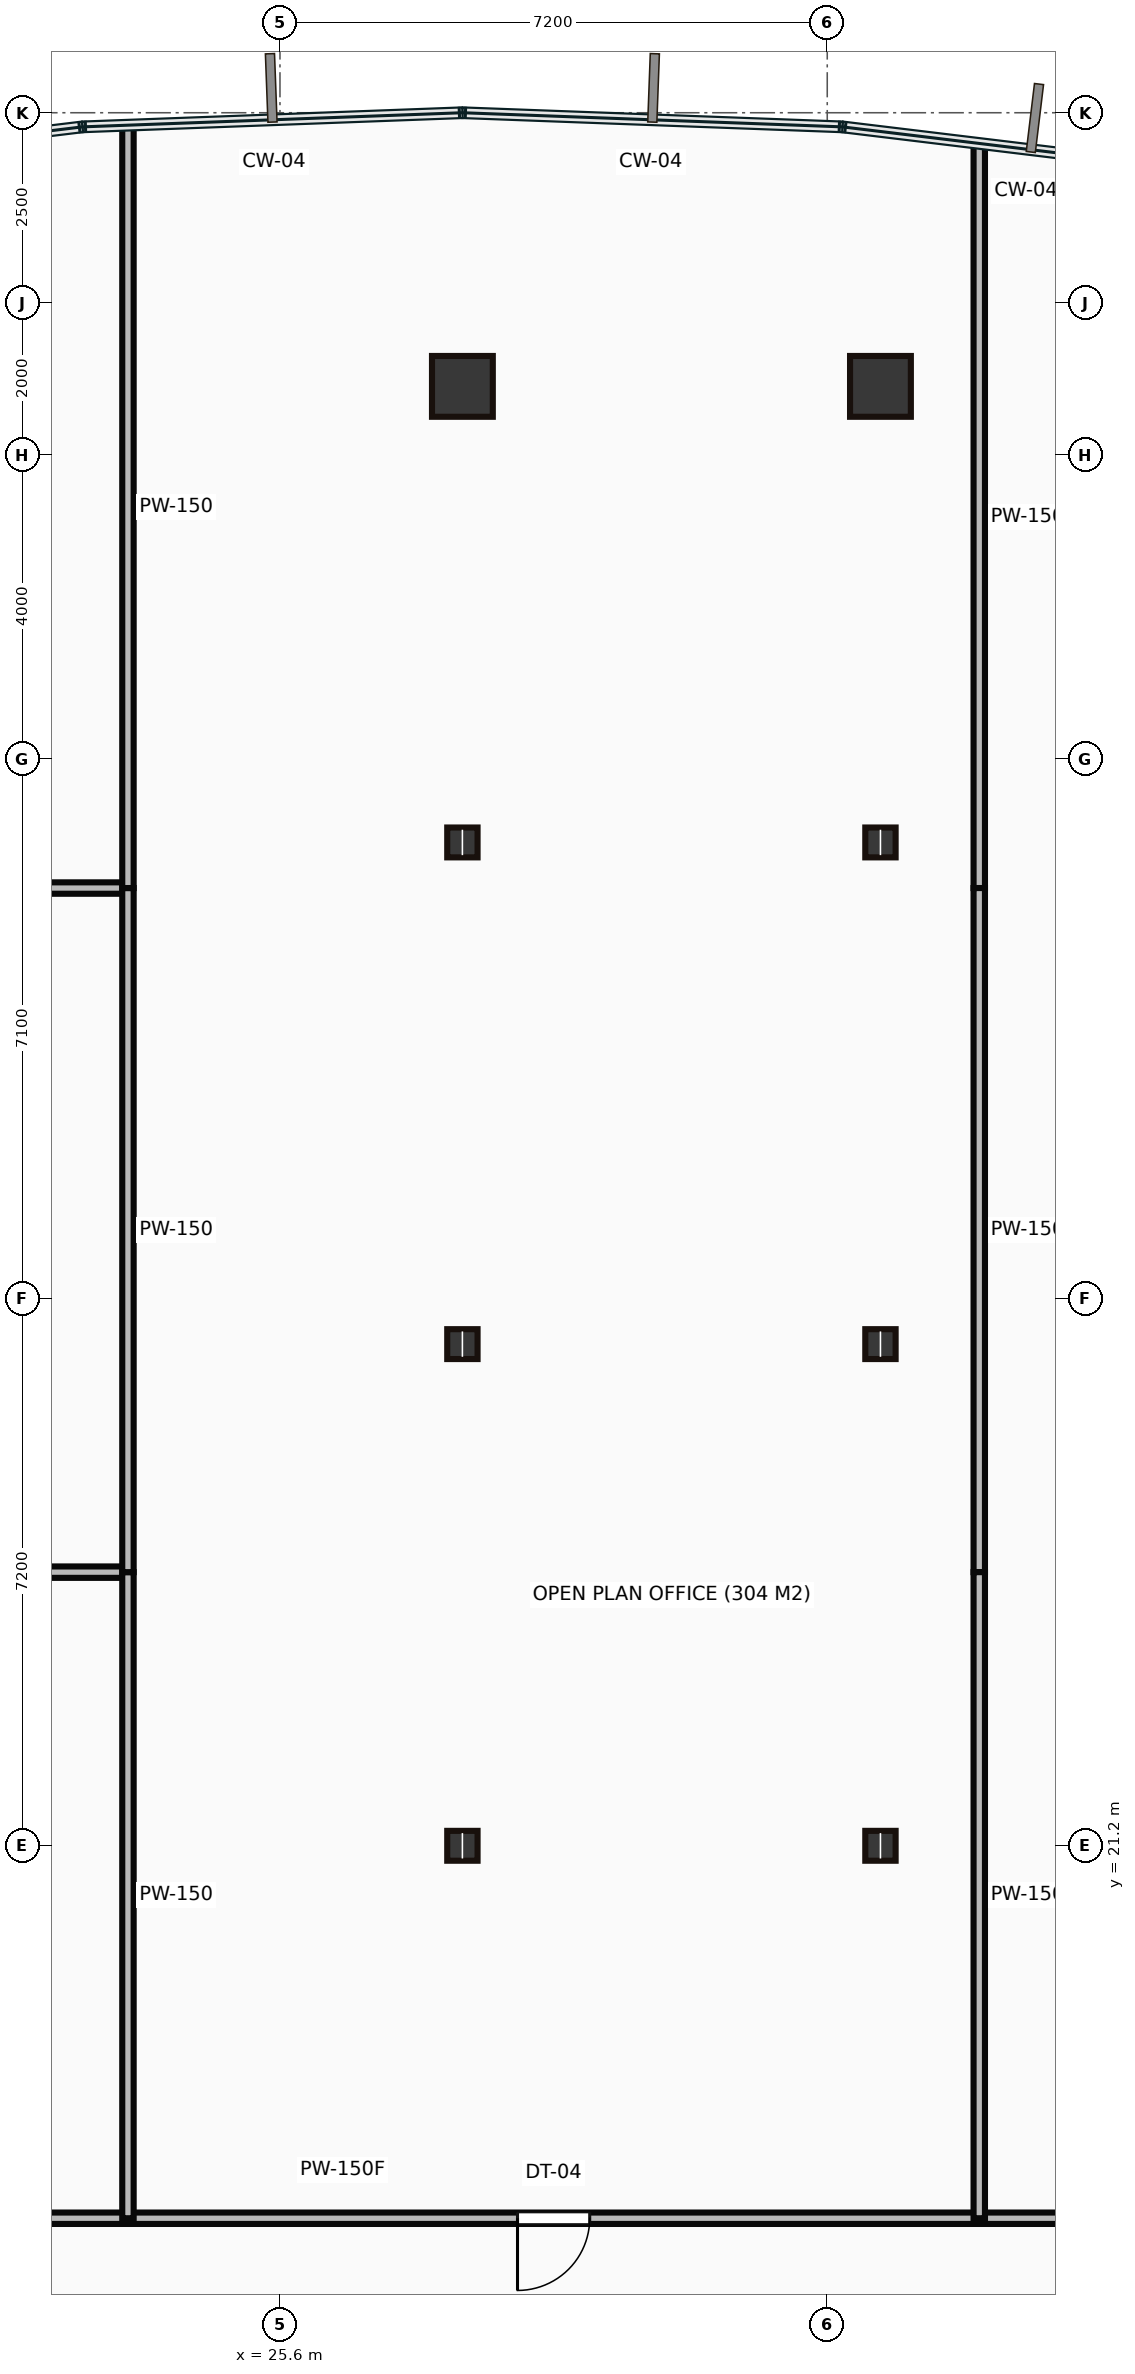
"""IFC4 building model, lengths in metres.
Left out: names, types, materials, properties, quantities, classifications, styles, units other than length and angle.
Written with IfcOpenShell. Run it as: python <this file> out.ifc"""

import sys

from ifc_helpers import new_model, si_unit, direction, frame, frame_2d, origin, origin_2d, place, context, subcontext, project, spatial, rectangle, hollow_rectangle, i_section, extrude, source, transform, mapped, element, fill, save


model = new_model("IFC4")
c1 = context("Model", 3, precision=1e-05, world=origin(), true_north=direction((0.0, 1.0)))
c2 = subcontext(c1, "Body", "Model", "MODEL_VIEW")
j1 = project(units=[si_unit("LENGTHUNIT", "METRE"), si_unit("PLANEANGLEUNIT", "RADIAN")], contexts=[c1])
p1 = place(None, origin())
s1 = spatial("IfcSite", under=j1, at=p1, CompositionType="ELEMENT")
p2 = place(p1, origin())
s2 = spatial("IfcBuilding", under=s1, at=p2, CompositionType="ELEMENT")
p3 = place(p2, frame((0.0, 0.0, 88.65)))
s3 = spatial("IfcBuildingStorey", under=s2, at=p3, CompositionType="ELEMENT", Elevation=88.65)
m1 = source(origin(), c2, "Body", "SweptSolid", [
    extrude(i_section(OverallWidth=0.399, OverallDepth=0.393, WebThickness=0.023, FlangeThickness=0.037, at=origin_2d()), origin(), (0.0, 0.0, 1.0), 3.65),
])
for number, where, z_axis, x_axis in (
    (1, (28.0, 21.2, 0.0), (0.0, 0.0, 1.0), (1.0, 0.0, 0.0)),
    (2, (28.0, 27.8, 0.0), (0.0, 0.0, 1.0), (1.0, 0.0, 0.0)),
    (3, (28.0, 34.4, 0.0), (0.0, 0.0, 1.0), (1.0, 0.0, 0.0)),
):
    element("IfcColumn", number, at=place(p3, frame(where, z_axis=z_axis, x_axis=x_axis)), inside=s3, PredefinedType="COLUMN", context=c2, shape_type="MappedRepresentation", body=[
        mapped(m1, transform((0.0, 0.0, 0.0))),
    ])
m2 = source(origin(), c2, "Body", "SweptSolid", [
    extrude(hollow_rectangle(XDim=0.8, YDim=0.8, WallThickness=0.04, at=origin_2d()), origin(), (0.0, 0.0, 1.0), 3.65),
])
p4 = place(p3, frame((28.0, 40.4, 0.0), z_axis=(0.0, 0.0, 1.0), x_axis=(1.0, 0.0, 0.0)))
e4 = element("IfcColumn", 4, at=p4, inside=s3, PredefinedType="COLUMN", context=c2, shape_type="MappedRepresentation", body=[
    mapped(m2, transform((0.0, 0.0, 0.0))),
])
for number, where, z_axis, x_axis in (
    (5, (33.5, 21.2, 0.0), (0.0, 0.0, 1.0), (1.0, 0.0, 0.0)),
    (6, (33.5, 27.8, 0.0), (0.0, 0.0, 1.0), (1.0, 0.0, 0.0)),
    (7, (33.5, 34.4, 0.0), (0.0, 0.0, 1.0), (1.0, 0.0, 0.0)),
):
    element("IfcColumn", number, at=place(p3, frame(where, z_axis=z_axis, x_axis=x_axis)), inside=s3, PredefinedType="COLUMN", context=c2, shape_type="MappedRepresentation", body=[
        mapped(m1, transform((0.0, 0.0, 0.0))),
    ])
p5 = place(p3, frame((33.5, 40.4, 0.0), z_axis=(0.0, 0.0, 1.0), x_axis=(1.0, 0.0, 0.0)))
e8 = element("IfcColumn", 8, at=p5, inside=s3, PredefinedType="COLUMN", context=c2, shape_type="MappedRepresentation", body=[
    mapped(m2, transform((0.0, 0.0, 0.0))),
])
m3 = source(origin(), c2, "Body", "SweptSolid", [
    extrude(rectangle(XDim=28.75, YDim=0.15, at=frame_2d((14.375, 0.0))), origin(), (0.0, 0.0, 1.0), 3.4),
])
p6 = place(p3, frame((12.05, 16.3, 0.0), z_axis=(0.0, 0.0, 1.0), x_axis=(1.0, 0.0, 0.0)))
e9 = element("IfcWall", 9, at=p6, inside=s3, PredefinedType="PARTITIONING", context=c2, shape_type="MappedRepresentation", body=[
    mapped(m3, transform((0.0, 0.0, 0.0))),
])
p7 = place(p6, frame((5.43, 0.0, 0.0)))
e10 = element("IfcOpeningElement", 10, at=p7, cuts=e9, PredefinedType="OPENING", context=c2, shape_type="SweptSolid", body=[
    extrude(rectangle(XDim=0.95, YDim=2.15, at=frame_2d((0.475, 1.075))), frame((0.0, 0.085, 0.0), z_axis=(0.0, -1.0, 0.0), x_axis=(1.0, 0.0, 0.0)), (0.0, 0.0, 1.0), 0.17),
])
p8 = place(p6, frame((16.675, 0.0, 0.0)))
e11 = element("IfcOpeningElement", 11, at=p8, cuts=e9, PredefinedType="OPENING", context=c2, shape_type="SweptSolid", body=[
    extrude(rectangle(XDim=0.95, YDim=2.15, at=frame_2d((0.475, 1.075))), frame((0.0, 0.085, 0.0), z_axis=(0.0, -1.0, 0.0), x_axis=(1.0, 0.0, 0.0)), (0.0, 0.0, 1.0), 0.17),
])
p9 = place(p6, frame((25.145, 0.0, 0.0)))
e12 = element("IfcOpeningElement", 12, at=p9, cuts=e9, PredefinedType="OPENING", context=c2, shape_type="SweptSolid", body=[
    extrude(rectangle(XDim=0.95, YDim=2.15, at=frame_2d((0.475, 1.075))), frame((0.0, 0.085, 0.0), z_axis=(0.0, -1.0, 0.0), x_axis=(1.0, 0.0, 0.0)), (0.0, 0.0, 1.0), 0.17),
])
m4 = source(origin(), c2, "Body", "SweptSolid", [
    extrude(rectangle(XDim=11.55, YDim=0.15, at=frame_2d((5.775, 0.0))), origin(), (0.0, 0.0, 1.0), 3.4),
])
for number, where, z_axis, x_axis in (
    (13, (12.05, 24.8, 0.0), (0.0, 0.0, 1.0), (1.0, 0.0, 0.0)),
    (14, (23.6, 33.8, 0.0), (0.0, 0.0, 1.0), (-1.0, 0.0, 0.0)),
):
    element("IfcWall", number, at=place(p3, frame(where, z_axis=z_axis, x_axis=x_axis)), inside=s3, PredefinedType="PARTITIONING", context=c2, shape_type="MappedRepresentation", body=[
        mapped(m4, transform((0.0, 0.0, 0.0))),
    ])
m5 = source(origin(), c2, "Body", "SweptSolid", [
    extrude(rectangle(XDim=8.5, YDim=0.15, at=frame_2d((4.25, 0.0))), origin(), (0.0, 0.0, 1.0), 3.4),
])
p10 = place(p3, frame((23.6, 24.8, 0.0), z_axis=(0.0, 0.0, 1.0), x_axis=(0.0, -1.0, 0.0)))
e15 = element("IfcWall", 15, at=p10, inside=s3, PredefinedType="PARTITIONING", context=c2, shape_type="MappedRepresentation", body=[
    mapped(m5, transform((0.0, 0.0, 0.0))),
])
m6 = source(origin(), c2, "Body", "SweptSolid", [
    extrude(rectangle(XDim=9.0, YDim=0.15, at=frame_2d((4.5, 0.0))), origin(), (0.0, 0.0, 1.0), 3.4),
])
p11 = place(p3, frame((23.6, 33.8, 0.0), z_axis=(0.0, 0.0, 1.0), x_axis=(0.0, -1.0, 0.0)))
e16 = element("IfcWall", 16, at=p11, inside=s3, PredefinedType="PARTITIONING", context=c2, shape_type="MappedRepresentation", body=[
    mapped(m6, transform((0.0, 0.0, 0.0))),
])
m7 = source(origin(), c2, "Body", "SweptSolid", [
    extrude(rectangle(XDim=10.016, YDim=0.15, at=frame_2d((5.008, 0.0))), origin(), (0.0, 0.0, 1.0), 3.4),
])
p12 = place(p3, frame((23.6, 43.816, 0.0), z_axis=(0.0, 0.0, 1.0), x_axis=(0.0, -1.0, 0.0)))
e17 = element("IfcWall", 17, at=p12, inside=s3, PredefinedType="PARTITIONING", context=c2, shape_type="MappedRepresentation", body=[
    mapped(m7, transform((0.0, 0.0, 0.0))),
])
m8 = source(origin(), c2, "Body", "SweptSolid", [
    extrude(rectangle(XDim=9.776, YDim=0.15, at=frame_2d((4.888, 0.0))), origin(), (0.0, 0.0, 1.0), 3.4),
])
p13 = place(p3, frame((34.8, 43.576, 0.0), z_axis=(0.0, 0.0, 1.0), x_axis=(0.0, -1.0, 0.0)))
e18 = element("IfcWall", 18, at=p13, inside=s3, PredefinedType="PARTITIONING", context=c2, shape_type="MappedRepresentation", body=[
    mapped(m8, transform((0.0, 0.0, 0.0))),
])
p14 = place(p3, frame((34.8, 33.8, 0.0), z_axis=(0.0, 0.0, 1.0), x_axis=(0.0, -1.0, 0.0)))
e19 = element("IfcWall", 19, at=p14, inside=s3, PredefinedType="PARTITIONING", context=c2, shape_type="MappedRepresentation", body=[
    mapped(m6, transform((0.0, 0.0, 0.0))),
])
p15 = place(p3, frame((34.8, 24.8, 0.0), z_axis=(0.0, 0.0, 1.0), x_axis=(0.0, -1.0, 0.0)))
e20 = element("IfcWall", 20, at=p15, inside=s3, PredefinedType="PARTITIONING", context=c2, shape_type="MappedRepresentation", body=[
    mapped(m5, transform((0.0, 0.0, 0.0))),
])
m9 = source(origin(), c2, "Body", "SweptSolid", [
    extrude(rectangle(XDim=0.95, YDim=2.15, at=frame_2d((0.475, 1.075))), frame((0.0, 0.025, 0.0), z_axis=(0.0, -1.0, 0.0), x_axis=(1.0, 0.0, 0.0)), (0.0, 0.0, 1.0), 0.05),
])
p16 = place(p8, origin())
e21 = element("IfcDoor", 21, at=p16, inside=s3, OperationType="SINGLE_SWING_LEFT", PredefinedType="DOOR", context=c2, shape_type="MappedRepresentation", body=[
    mapped(m9, transform((0.0, 0.0, 0.0))),
])
fill(e11, e21)
save(model, sys.argv[1])
